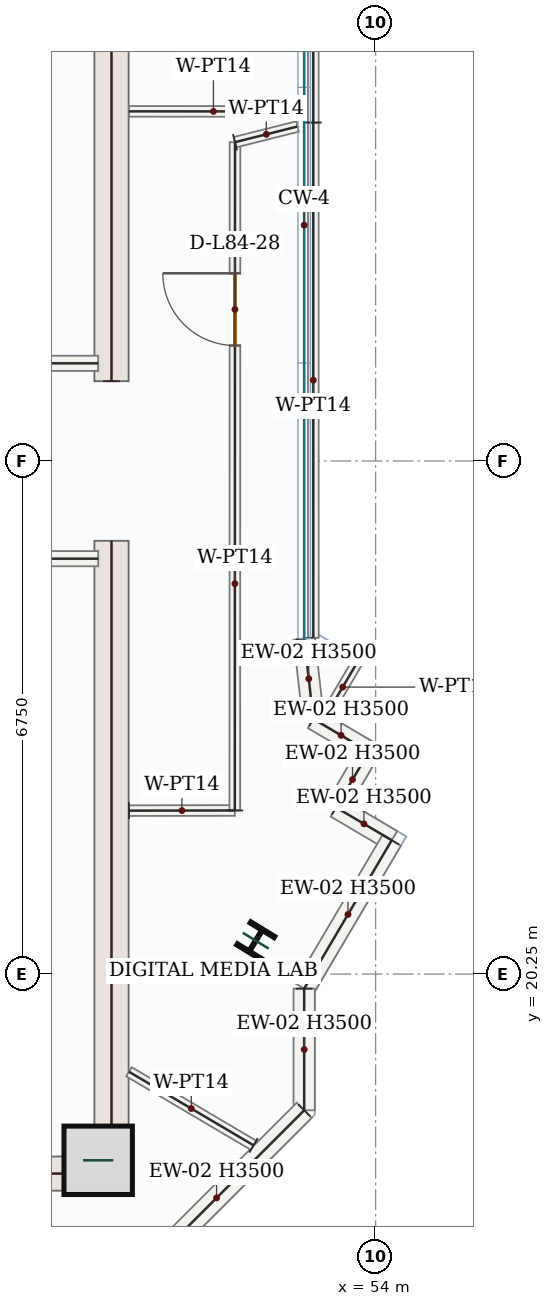
"""IFC4 building model, lengths in metres.
Left out: names, types, materials, properties, quantities, classifications, styles, units other than length and angle.
Written with IfcOpenShell. Run it as: python <this file> out.ifc"""

import sys

from ifc_helpers import new_model, si_unit, direction, frame, frame_2d, origin, origin_2d, place, context, subcontext, project, spatial, rectangle, i_section, extrude, source, transform, mapped, element, fill, save


model = new_model("IFC4")
c1 = context("Model", 3, precision=1e-05, world=origin(), true_north=direction((0.0, 1.0)))
c2 = subcontext(c1, "Body", "Model", "MODEL_VIEW")
j1 = project(units=[si_unit("LENGTHUNIT", "METRE"), si_unit("PLANEANGLEUNIT", "RADIAN")], contexts=[c1])
p1 = place(None, origin())
s1 = spatial("IfcSite", under=j1, at=p1, CompositionType="ELEMENT")
p2 = place(p1, origin())
s2 = spatial("IfcBuilding", under=s1, at=p2, CompositionType="ELEMENT")
p3 = place(p2, frame((0.0, 0.0, 346.05)))
s3 = spatial("IfcBuildingStorey", under=s2, at=p3, CompositionType="ELEMENT", Elevation=346.05)
m1 = source(origin(), c2, "Body", "SweptSolid", [
    extrude(rectangle(XDim=8.55, YDim=0.45, at=frame_2d((4.275, 0.0))), origin(), (0.0, 0.0, 1.0), 3.5),
])
for number, where, z_axis, x_axis in (
    (1, (50.525, 17.4, 0.0), (0.0, 0.0, 1.0), (0.0, 1.0, 0.0)),
    (2, (50.525, 28.05, 0.0), (0.0, 0.0, 1.0), (0.0, 1.0, 0.0)),
):
    element("IfcWall", number, at=place(p3, frame(where, z_axis=z_axis, x_axis=x_axis)), inside=s3, PredefinedType="SHEAR", context=c2, shape_type="MappedRepresentation", body=[
        mapped(m1, transform((0.0, 0.0, 0.0), x_axis=(1.0, 0.0, 0.0), y_axis=(0.0, 1.0, 0.0), z_axis=(0.0, 0.0, 1.0), scale=1.0)),
    ])
m2 = source(origin(), c2, "Body", "SweptSolid", [
    extrude(rectangle(XDim=7.1, YDim=0.45, at=frame_2d((3.55, 0.0))), origin(), (0.0, 0.0, 1.0), 3.5),
])
p4 = place(p3, frame((43.2, 17.625, 0.0), z_axis=(0.0, 0.0, 1.0), x_axis=(1.0, 0.0, 0.0)))
e3 = element("IfcWall", 3, at=p4, inside=s3, PredefinedType="SHEAR", context=c2, shape_type="MappedRepresentation", body=[
    mapped(m2, transform((0.0, 0.0, 0.0), x_axis=(1.0, 0.0, 0.0), y_axis=(0.0, 1.0, 0.0), z_axis=(0.0, 0.0, 1.0), scale=1.0)),
])
m3 = source(origin(), c2, "Body", "SweptSolid", [
    extrude(rectangle(XDim=0.9, YDim=0.9, at=origin_2d()), origin(), (0.0, 0.0, 1.0), 3.75),
])
p5 = place(p3, frame((50.35, 17.8, 0.0), z_axis=(0.0, 0.0, 1.0), x_axis=(1.0, 0.0, 0.0)))
e4 = element("IfcColumn", 4, at=p5, inside=s3, PredefinedType="COLUMN", context=c2, shape_type="MappedRepresentation", body=[
    mapped(m3, transform((0.0, 0.0, 0.0), x_axis=(1.0, 0.0, 0.0), y_axis=(0.0, 1.0, 0.0), z_axis=(0.0, 0.0, 1.0), scale=1.0)),
])
m4 = source(origin(), c2, "Body", "SweptSolid", [
    extrude(i_section(OverallWidth=0.369, OverallDepth=0.356, WebThickness=0.011, FlangeThickness=0.018, FilletRadius=0.018, at=origin_2d()), origin(), (0.0, 0.0, 1.0), 3.75),
])
p6 = place(p3, frame((52.423, 20.689, 0.0), z_axis=(0.0, 0.0, 1.0), x_axis=(-0.852640164354, 0.522498564716, 0.0)))
e5 = element("IfcColumn", 5, at=p6, inside=s3, PredefinedType="COLUMN", context=c2, shape_type="MappedRepresentation", body=[
    mapped(m4, transform((0.0, 0.0, 0.0), x_axis=(1.0, 0.0, 0.0), y_axis=(0.0, 1.0, 0.0), z_axis=(0.0, 0.0, 1.0), scale=1.0)),
])
m5 = source(origin(), c2, "Body", "SweptSolid", [
    extrude(rectangle(XDim=1.065, YDim=0.28, at=frame_2d((0.532, 0.0))), origin(), (0.0, 0.0, 1.0), 3.5),
])
p7 = place(p3, frame((53.06, 24.664, 0.0), z_axis=(0.0, 0.0, 1.0), x_axis=(0.112595815397, -0.993640871923, 0.0)))
e6 = element("IfcWall", 6, at=p7, inside=s3, PredefinedType="SOLIDWALL", context=c2, shape_type="MappedRepresentation", body=[
    mapped(m5, transform((0.0, 0.0, 0.0), x_axis=(1.0, 0.0, 0.0), y_axis=(0.0, 1.0, 0.0), z_axis=(0.0, 0.0, 1.0), scale=1.0)),
])
m6 = source(origin(), c2, "Body", "SweptSolid", [
    extrude(rectangle(XDim=0.85, YDim=0.28, at=frame_2d((0.425, 0.0))), origin(), (0.0, 0.0, 1.0), 3.5),
])
for number, where, z_axis, x_axis in (
    (7, (53.18, 23.606, 0.0), (0.0, 0.0, 1.0), (0.861, -0.508, 0.0)),
    (8, (53.912, 23.175, 0.0), (0.0, 0.0, 1.0), (-0.508, -0.861, 0.0)),
):
    element("IfcWall", number, at=place(p3, frame(where, z_axis=z_axis, x_axis=x_axis)), inside=s3, PredefinedType="SOLIDWALL", context=c2, shape_type="MappedRepresentation", body=[
        mapped(m6, transform((0.0, 0.0, 0.0), x_axis=(1.0, 0.0, 0.0), y_axis=(0.0, 1.0, 0.0), z_axis=(0.0, 0.0, 1.0), scale=1.0)),
    ])
m7 = source(origin(), c2, "Body", "SweptSolid", [
    extrude(rectangle(XDim=0.85, YDim=0.28, at=frame_2d((0.425, 0.0))), origin(), (0.0, 0.0, 1.0), 3.5),
])
p8 = place(p3, frame((53.48, 22.442, 0.0), z_axis=(0.0, 0.0, 1.0), x_axis=(0.861246626019, -0.508187218622, 0.0)))
e9 = element("IfcWall", 9, at=p8, inside=s3, PredefinedType="SOLIDWALL", context=c2, shape_type="MappedRepresentation", body=[
    mapped(m7, transform((0.0, 0.0, 0.0), x_axis=(1.0, 0.0, 0.0), y_axis=(0.0, 1.0, 0.0), z_axis=(0.0, 0.0, 1.0), scale=1.0)),
])
m8 = source(origin(), c2, "Body", "SweptSolid", [
    extrude(rectangle(XDim=2.266, YDim=0.28, at=frame_2d((1.133, 0.0))), origin(), (0.0, 0.0, 1.0), 3.5),
])
p9 = place(p3, frame((54.212, 22.01, 0.0), z_axis=(0.0, 0.0, 1.0), x_axis=(-0.508224770074, -0.861224467304, 0.0)))
e10 = element("IfcWall", 10, at=p9, inside=s3, PredefinedType="SOLIDWALL", context=c2, shape_type="MappedRepresentation", body=[
    mapped(m8, transform((0.0, 0.0, 0.0), x_axis=(1.0, 0.0, 0.0), y_axis=(0.0, 1.0, 0.0), z_axis=(0.0, 0.0, 1.0), scale=1.0)),
])
m9 = source(origin(), c2, "Body", "SweptSolid", [
    extrude(rectangle(XDim=1.601, YDim=0.28, at=frame_2d((0.8, 0.0))), origin(), (0.0, 0.0, 1.0), 3.5),
])
p10 = place(p3, frame((53.06, 20.059, 0.0), z_axis=(0.0, 0.0, 1.0), x_axis=(0.0, -1.0, 0.0)))
e11 = element("IfcWall", 11, at=p10, inside=s3, PredefinedType="SOLIDWALL", context=c2, shape_type="MappedRepresentation", body=[
    mapped(m9, transform((0.0, 0.0, 0.0), x_axis=(1.0, 0.0, 0.0), y_axis=(0.0, 1.0, 0.0), z_axis=(0.0, 0.0, 1.0), scale=1.0)),
])
m10 = source(origin(), c2, "Body", "SweptSolid", [
    extrude(rectangle(XDim=3.261, YDim=0.28, at=frame_2d((1.63, 0.0))), origin(), (0.0, 0.0, 1.0), 3.5),
])
p11 = place(p3, frame((53.06, 18.458, 0.0), z_axis=(0.0, 0.0, 1.0), x_axis=(-0.707106781187, -0.707106781187, 0.0)))
e12 = element("IfcWall", 12, at=p11, inside=s3, PredefinedType="SOLIDWALL", context=c2, shape_type="MappedRepresentation", body=[
    mapped(m10, transform((0.0, 0.0, 0.0), x_axis=(1.0, 0.0, 0.0), y_axis=(0.0, 1.0, 0.0), z_axis=(0.0, 0.0, 1.0), scale=1.0)),
])
m11 = source(origin(), c2, "Body", "SweptSolid", [
    extrude(rectangle(XDim=4.25, YDim=0.2, at=frame_2d((2.125, 0.0))), origin(), (0.0, 0.0, 1.0), 3.5),
])
for number, where, z_axis, x_axis in (
    (13, (46.1, 25.715, 0.0), (0.0, 0.0, 1.0), (1.0, 0.0, 0.0)),
    (14, (46.1, 28.285, 0.0), (0.0, 0.0, 1.0), (1.0, 0.0, 0.0)),
):
    element("IfcWall", number, at=place(p3, frame(where, z_axis=z_axis, x_axis=x_axis)), inside=s3, PredefinedType="SOLIDWALL", context=c2, shape_type="MappedRepresentation", body=[
        mapped(m11, transform((0.0, 0.0, 0.0), x_axis=(1.0, 0.0, 0.0), y_axis=(0.0, 1.0, 0.0), z_axis=(0.0, 0.0, 1.0), scale=1.0)),
    ])
m12 = source(origin(), c2, "Body", "SweptSolid", [
    extrude(rectangle(XDim=1.393, YDim=0.14, at=frame_2d((0.696, 0.0))), origin(), (0.0, 0.0, 1.0), 3.5),
])
p12 = place(p3, frame((50.755, 22.4, 0.0), z_axis=(0.0, 0.0, 1.0), x_axis=(0.999998755213, 0.001577838148, 0.0)))
e15 = element("IfcWall", 15, at=p12, inside=s3, PredefinedType="PARTITIONING", context=c2, shape_type="MappedRepresentation", body=[
    mapped(m12, transform((0.0, 0.0, 0.0), x_axis=(1.0, 0.0, 0.0), y_axis=(0.0, 1.0, 0.0), z_axis=(0.0, 0.0, 1.0), scale=1.0)),
])
p13 = place(p3, frame((52.147, 22.402, 0.0), z_axis=(0.0, 0.0, 1.0), x_axis=(0.000277685205, 0.999999961445, 0.0)))
e16 = element("IfcWall", 16, at=p13, inside=s3, PredefinedType="PARTITIONING", context=c2, shape_type="SweptSolid", body=[
    extrude(rectangle(XDim=8.792, YDim=0.14, at=frame_2d((4.396, 0.0))), origin(), (0.0, 0.0, 1.0), 3.5),
])
p14 = place(p13, frame((6.117, 0.0, 0.0)))
e17 = element("IfcOpeningElement", 17, at=p14, cuts=e16, PredefinedType="OPENING", context=c2, shape_type="SweptSolid", body=[
    extrude(rectangle(XDim=0.95, YDim=2.15, at=frame_2d((0.475, 1.075))), frame((0.0, 0.08, 0.0), z_axis=(0.0, -1.0, 0.0), x_axis=(1.0, 0.0, 0.0)), (0.0, 0.0, 1.0), 0.16),
])
m13 = source(origin(), c2, "Body", "SweptSolid", [
    extrude(rectangle(XDim=0.848, YDim=0.14, at=frame_2d((0.424, 0.0))), origin(), (0.0, 0.0, 1.0), 3.5),
])
p15 = place(p3, frame((52.15, 31.194, 0.0), z_axis=(0.0, 0.0, 1.0), x_axis=(0.969955921728, 0.243280722428, 0.0)))
e18 = element("IfcWall", 18, at=p15, inside=s3, PredefinedType="PARTITIONING", context=c2, shape_type="MappedRepresentation", body=[
    mapped(m13, transform((0.0, 0.0, 0.0), x_axis=(1.0, 0.0, 0.0), y_axis=(0.0, 1.0, 0.0), z_axis=(0.0, 0.0, 1.0), scale=1.0)),
])
m14 = source(origin(), c2, "Body", "SweptSolid", [
    extrude(rectangle(XDim=6.78, YDim=0.14, at=frame_2d((3.39, 0.0))), origin(), (0.0, 0.0, 1.0), 3.5),
])
p16 = place(p3, frame((53.18, 31.453, 0.0), z_axis=(0.0, 0.0, 1.0), x_axis=(7.2022759e-05, -0.999999997406, 0.0)))
e19 = element("IfcWall", 19, at=p16, inside=s3, PredefinedType="PARTITIONING", context=c2, shape_type="MappedRepresentation", body=[
    mapped(m14, transform((0.0, 0.0, 0.0), x_axis=(1.0, 0.0, 0.0), y_axis=(0.0, 1.0, 0.0), z_axis=(0.0, 0.0, 1.0), scale=1.0)),
])
m15 = source(origin(), c2, "Body", "SweptSolid", [
    extrude(rectangle(XDim=0.825, YDim=0.14, at=frame_2d((0.413, 0.0))), origin(), (0.0, 0.0, 1.0), 3.5),
])
p17 = place(p3, frame((53.776, 24.381, 0.0), z_axis=(0.0, 0.0, 1.0), x_axis=(-0.507472658058, -0.861667860213, 0.0)))
e20 = element("IfcWall", 20, at=p17, inside=s3, PredefinedType="PARTITIONING", context=c2, shape_type="MappedRepresentation", body=[
    mapped(m15, transform((0.0, 0.0, 0.0), x_axis=(1.0, 0.0, 0.0), y_axis=(0.0, 1.0, 0.0), z_axis=(0.0, 0.0, 1.0), scale=1.0)),
])
m16 = source(origin(), c2, "Body", "SweptSolid", [
    extrude(rectangle(XDim=1.904, YDim=0.14, at=frame_2d((0.952, 0.0))), origin(), (0.0, 0.0, 1.0), 3.5),
])
p18 = place(p3, frame((52.394, 17.997, 0.0), z_axis=(0.0, 0.0, 1.0), x_axis=(-0.86120470185, 0.508258262611, 0.0)))
e21 = element("IfcWall", 21, at=p18, inside=s3, PredefinedType="PARTITIONING", context=c2, shape_type="MappedRepresentation", body=[
    mapped(m16, transform((0.0, 0.0, 0.0), x_axis=(1.0, 0.0, 0.0), y_axis=(0.0, 1.0, 0.0), z_axis=(0.0, 0.0, 1.0), scale=1.0)),
])
m17 = source(origin(), c2, "Body", "SweptSolid", [
    extrude(rectangle(XDim=2.223, YDim=0.14, at=frame_2d((1.111, 0.0))), origin(), (0.0, 0.0, 1.0), 3.5),
])
p19 = place(p3, frame((52.978, 31.598, 0.0), z_axis=(0.0, 0.0, 1.0), x_axis=(-0.999999704402, 0.000768892567, 0.0)))
e22 = element("IfcWall", 22, at=p19, inside=s3, PredefinedType="PARTITIONING", context=c2, shape_type="MappedRepresentation", body=[
    mapped(m17, transform((0.0, 0.0, 0.0), x_axis=(1.0, 0.0, 0.0), y_axis=(0.0, 1.0, 0.0), z_axis=(0.0, 0.0, 1.0), scale=1.0)),
])
m18 = source(origin(), c2, "Body", "SweptSolid", [
    extrude(rectangle(XDim=4.139, YDim=0.14, at=frame_2d((2.07, 0.0))), origin(), (0.0, 0.0, 1.0), 3.5),
])
p20 = place(p3, frame((53.18, 35.592, 0.0), z_axis=(0.0, 0.0, 1.0), x_axis=(0.0, -1.0, 0.0)))
e23 = element("IfcWall", 23, at=p20, inside=s3, PredefinedType="PARTITIONING", context=c2, shape_type="MappedRepresentation", body=[
    mapped(m18, transform((0.0, 0.0, 0.0), x_axis=(1.0, 0.0, 0.0), y_axis=(0.0, 1.0, 0.0), z_axis=(0.0, 0.0, 1.0), scale=1.0)),
])
m19 = source(origin(), c2, "Body", "SweptSolid", [
    extrude(rectangle(XDim=0.95, YDim=2.15, at=frame_2d((0.475, 1.075))), frame((0.0, 0.025, 0.0), z_axis=(0.0, -1.0, 0.0), x_axis=(1.0, 0.0, 0.0)), (0.0, 0.0, 1.0), 0.05),
])
p21 = place(p14, origin())
e24 = element("IfcDoor", 24, at=p21, inside=s3, OperationType="SINGLE_SWING_RIGHT", PredefinedType="DOOR", context=c2, shape_type="MappedRepresentation", body=[
    mapped(m19, transform((0.0, 0.0, 0.0), x_axis=(1.0, 0.0, 0.0), y_axis=(0.0, 1.0, 0.0), z_axis=(0.0, 0.0, 1.0), scale=1.0)),
])
fill(e17, e24)
save(model, sys.argv[1])
